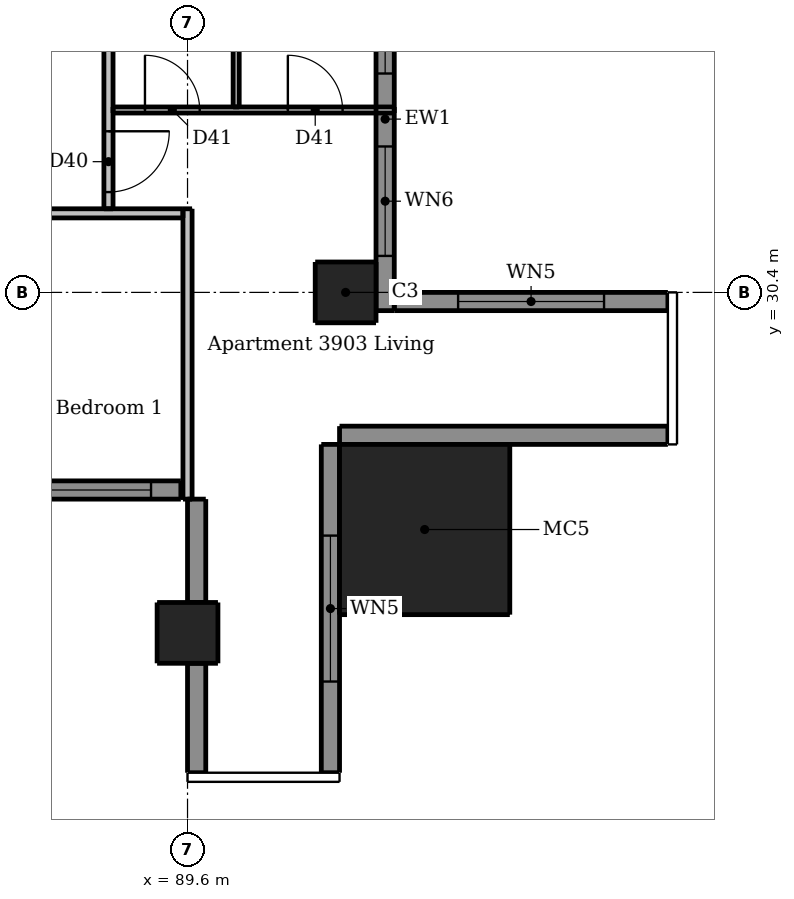
"""IFC4 building model, lengths in metres.
Left out: names, types, materials, properties, quantities, classifications, styles, units other than length and angle.
Written with IfcOpenShell. Run it as: python <this file> out.ifc"""

import sys

from ifc_helpers import new_model, si_unit, direction, frame, frame_2d, origin, origin_2d, place, context, subcontext, project, spatial, rectangle, extrude, element, fill, save


model = new_model("IFC4")
c1 = context("Model", 3, precision=1e-05, world=origin(), true_north=direction((0.0, 1.0)))
c2 = subcontext(c1, "Body", "Model", "MODEL_VIEW")
j1 = project(units=[si_unit("LENGTHUNIT", "METRE"), si_unit("PLANEANGLEUNIT", "RADIAN")], contexts=[c1])
p1 = place(None, origin())
s1 = spatial("IfcSite", under=j1, at=p1, CompositionType="ELEMENT")
p2 = place(p1, origin())
s2 = spatial("IfcBuilding", under=s1, at=p2, CompositionType="ELEMENT")
p3 = place(p2, frame((0.0, 0.0, 147.1)))
s3 = spatial("IfcBuildingStorey", under=s2, at=p3, CompositionType="ELEMENT", Elevation=147.1)
for number, where, z_axis, x_axis in (
    (1, (89.6, 24.8, 0.0), (0.0, 0.0, 1.0), (1.0, 0.0, 0.0)),
    (2, (92.2, 30.4, 0.0), (0.0, 0.0, 1.0), (1.0, 0.0, 0.0)),
):
    element("IfcColumn", number, at=place(p3, frame(where, z_axis=z_axis, x_axis=x_axis)), inside=s3, PredefinedType="COLUMN", context=c2, shape_type="SweptSolid", body=[
        extrude(rectangle(XDim=1.0, YDim=1.0, at=origin_2d()), origin(), (0.0, 0.0, 1.0), 3.0),
    ])
p4 = place(p3, frame((93.5, 26.5, 0.0), z_axis=(0.0, 0.0, 1.0), x_axis=(1.0, 0.0, 0.0)))
e3 = element("IfcColumn", 3, at=p4, inside=s3, PredefinedType="COLUMN", context=c2, shape_type="SweptSolid", body=[
    extrude(rectangle(XDim=2.8, YDim=2.8, at=origin_2d()), origin(), (0.0, 0.0, 1.0), 3.3),
])
p5 = place(p3, frame((89.75, 27.0, 0.0), z_axis=(0.0, 0.0, 1.0), x_axis=(0.0, -1.0, 0.0)))
e4 = element("IfcWall", 4, at=p5, inside=s3, PredefinedType="SOLIDWALL", context=c2, shape_type="SweptSolid", body=[
    extrude(rectangle(XDim=1.7, YDim=0.3, at=frame_2d((0.85, 0.0))), origin(), (0.0, 0.0, 1.0), 3.0),
])
p6 = place(p3, frame((89.75, 24.3, 0.0), z_axis=(0.0, 0.0, 1.0), x_axis=(0.0, -1.0, 0.0)))
e5 = element("IfcWall", 5, at=p6, inside=s3, PredefinedType="SOLIDWALL", context=c2, shape_type="SweptSolid", body=[
    extrude(rectangle(XDim=1.8, YDim=0.3, at=frame_2d((0.9, 0.0))), origin(), (0.0, 0.0, 1.0), 3.0),
])
p7 = place(p3, frame((91.95, 22.5, 0.0), z_axis=(0.0, 0.0, 1.0), x_axis=(0.0, 1.0, 0.0)))
e6 = element("IfcWall", 6, at=p7, inside=s3, PredefinedType="SOLIDWALL", context=c2, shape_type="SweptSolid", body=[
    extrude(rectangle(XDim=5.4, YDim=0.3, at=frame_2d((2.7, 0.0))), origin(), (0.0, 0.0, 1.0), 3.0),
])
p8 = place(p7, frame((1.5, 0.0, 0.15)))
e7 = element("IfcOpeningElement", 7, at=p8, cuts=e6, PredefinedType="OPENING", context=c2, shape_type="SweptSolid", body=[
    extrude(rectangle(XDim=2.4, YDim=2.1, at=frame_2d((1.2, 1.05))), frame((0.0, 0.16, 0.0), z_axis=(0.0, -1.0, 0.0), x_axis=(1.0, 0.0, 0.0)), (0.0, 0.0, 1.0), 0.32),
])
p9 = place(p3, frame((92.1, 28.05, 0.0), z_axis=(0.0, 0.0, 1.0), x_axis=(1.0, 0.0, 0.0)))
e8 = element("IfcWall", 8, at=p9, inside=s3, PredefinedType="SOLIDWALL", context=c2, shape_type="SweptSolid", body=[
    extrude(rectangle(XDim=5.4, YDim=0.3, at=frame_2d((2.7, 0.0))), origin(), (0.0, 0.0, 1.0), 3.0),
])
p10 = place(p3, frame((97.5, 30.25, 0.0), z_axis=(0.0, 0.0, 1.0), x_axis=(-1.0, 0.0, 0.0)))
e9 = element("IfcWall", 9, at=p10, inside=s3, PredefinedType="SOLIDWALL", context=c2, shape_type="SweptSolid", body=[
    extrude(rectangle(XDim=4.5, YDim=0.3, at=frame_2d((2.25, 0.0))), origin(), (0.0, 0.0, 1.0), 3.0),
])
p11 = place(p10, frame((1.05, 0.0, 0.15)))
e10 = element("IfcOpeningElement", 10, at=p11, cuts=e9, PredefinedType="OPENING", context=c2, shape_type="SweptSolid", body=[
    extrude(rectangle(XDim=2.4, YDim=2.1, at=frame_2d((1.2, 1.05))), frame((0.0, 0.16, 0.0), z_axis=(0.0, -1.0, 0.0), x_axis=(1.0, 0.0, 0.0)), (0.0, 0.0, 1.0), 0.32),
])
p12 = place(p3, frame((83.7, 27.15, 0.0), z_axis=(0.0, 0.0, 1.0), x_axis=(1.0, 0.0, 0.0)))
e11 = element("IfcWall", 11, at=p12, inside=s3, PredefinedType="SOLIDWALL", context=c2, shape_type="SweptSolid", body=[
    extrude(rectangle(XDim=5.79, YDim=0.3, at=frame_2d((2.895, 0.0))), origin(), (0.0, 0.0, 1.0), 3.0),
])
p13 = place(p12, frame((0.5, 0.0, 0.15)))
e12 = element("IfcOpeningElement", 12, at=p13, cuts=e11, PredefinedType="OPENING", context=c2, shape_type="SweptSolid", body=[
    extrude(rectangle(XDim=1.8, YDim=2.1, at=frame_2d((0.9, 1.05))), frame((0.0, 0.16, 0.0), z_axis=(0.0, -1.0, 0.0), x_axis=(1.0, 0.0, 0.0)), (0.0, 0.0, 1.0), 0.32),
])
p14 = place(p12, frame((3.5, 0.0, 0.15)))
e13 = element("IfcOpeningElement", 13, at=p14, cuts=e11, PredefinedType="OPENING", context=c2, shape_type="SweptSolid", body=[
    extrude(rectangle(XDim=1.8, YDim=2.1, at=frame_2d((0.9, 1.05))), frame((0.0, 0.16, 0.0), z_axis=(0.0, -1.0, 0.0), x_axis=(1.0, 0.0, 0.0)), (0.0, 0.0, 1.0), 0.32),
])
p15 = place(p3, frame((92.85, 30.1, 0.0), z_axis=(0.0, 0.0, 1.0), x_axis=(0.0, 1.0, 0.0)))
e14 = element("IfcWall", 14, at=p15, inside=s3, PredefinedType="SOLIDWALL", context=c2, shape_type="SweptSolid", body=[
    extrude(rectangle(XDim=6.3, YDim=0.3, at=frame_2d((3.15, 0.0))), origin(), (0.0, 0.0, 1.0), 3.0),
])
p16 = place(p15, frame((0.9, 0.0, 0.15)))
e15 = element("IfcOpeningElement", 15, at=p16, cuts=e14, PredefinedType="OPENING", context=c2, shape_type="SweptSolid", body=[
    extrude(rectangle(XDim=1.8, YDim=2.1, at=frame_2d((0.9, 1.05))), frame((0.0, 0.16, 0.0), z_axis=(0.0, -1.0, 0.0), x_axis=(1.0, 0.0, 0.0)), (0.0, 0.0, 1.0), 0.32),
])
p17 = place(p15, frame((3.9, 0.0, 0.15)))
e16 = element("IfcOpeningElement", 16, at=p17, cuts=e14, PredefinedType="OPENING", context=c2, shape_type="SweptSolid", body=[
    extrude(rectangle(XDim=1.8, YDim=2.1, at=frame_2d((0.9, 1.05))), frame((0.0, 0.16, 0.0), z_axis=(0.0, -1.0, 0.0), x_axis=(1.0, 0.0, 0.0)), (0.0, 0.0, 1.0), 0.32),
])
p18 = place(p3, frame((90.4, 33.45, 0.0), z_axis=(0.0, 0.0, 1.0), x_axis=(0.0, 1.0, 0.0)))
e17 = element("IfcWall", 17, at=p18, inside=s3, PredefinedType="PARTITIONING", context=c2, shape_type="SweptSolid", body=[
    extrude(rectangle(XDim=5.875, YDim=0.1, at=frame_2d((2.938, 0.0))), origin(), (0.0, 0.0, 1.0), 3.0),
])
p19 = place(p18, frame((3.75, 0.0, 0.0)))
e18 = element("IfcOpeningElement", 18, at=p19, cuts=e17, PredefinedType="OPENING", context=c2, shape_type="SweptSolid", body=[
    extrude(rectangle(XDim=0.8, YDim=2.1, at=frame_2d((0.4, 1.05))), frame((0.0, 0.06, 0.0), z_axis=(0.0, -1.0, 0.0), x_axis=(1.0, 0.0, 0.0)), (0.0, 0.0, 1.0), 0.12),
])
p20 = place(p3, frame((88.375, 33.4, 0.0), z_axis=(0.0, 0.0, 1.0), x_axis=(1.0, 0.0, 0.0)))
e19 = element("IfcWall", 19, at=p20, inside=s3, PredefinedType="PARTITIONING", context=c2, shape_type="SweptSolid", body=[
    extrude(rectangle(XDim=4.625, YDim=0.1, at=frame_2d((2.312, 0.0))), origin(), (0.0, 0.0, 1.0), 3.0),
])
p21 = place(p20, frame((0.525, 0.0, 0.0)))
e20 = element("IfcOpeningElement", 20, at=p21, cuts=e19, PredefinedType="OPENING", context=c2, shape_type="SweptSolid", body=[
    extrude(rectangle(XDim=0.9, YDim=2.1, at=frame_2d((0.45, 1.05))), frame((0.0, 0.06, 0.0), z_axis=(0.0, -1.0, 0.0), x_axis=(1.0, 0.0, 0.0)), (0.0, 0.0, 1.0), 0.12),
])
p22 = place(p20, frame((2.875, 0.0, 0.0)))
e21 = element("IfcOpeningElement", 21, at=p22, cuts=e19, PredefinedType="OPENING", context=c2, shape_type="SweptSolid", body=[
    extrude(rectangle(XDim=0.9, YDim=2.1, at=frame_2d((0.45, 1.05))), frame((0.0, 0.06, 0.0), z_axis=(0.0, -1.0, 0.0), x_axis=(1.0, 0.0, 0.0)), (0.0, 0.0, 1.0), 0.12),
])
p23 = place(p3, frame((88.3, 60.475, 0.0), z_axis=(0.0, 0.0, 1.0), x_axis=(0.0, -1.0, 0.0)))
e22 = element("IfcWall", 22, at=p23, inside=s3, PredefinedType="PARTITIONING", context=c2, shape_type="SweptSolid", body=[
    extrude(rectangle(XDim=28.7, YDim=0.15, at=frame_2d((14.35, 0.0))), origin(), (0.0, 0.0, 1.0), 3.0),
])
p24 = place(p23, frame((27.425, 0.0, 0.0)))
e23 = element("IfcOpeningElement", 23, at=p24, cuts=e22, PredefinedType="OPENING", context=c2, shape_type="SweptSolid", body=[
    extrude(rectangle(XDim=1.0, YDim=2.1, at=frame_2d((0.5, 1.05))), frame((0.0, 0.085, 0.0), z_axis=(0.0, -1.0, 0.0), x_axis=(1.0, 0.0, 0.0)), (0.0, 0.0, 1.0), 0.17),
])
p25 = place(p23, frame((13.075, 0.0, 0.0)))
e24 = element("IfcOpeningElement", 24, at=p25, cuts=e22, PredefinedType="OPENING", context=c2, shape_type="SweptSolid", body=[
    extrude(rectangle(XDim=1.0, YDim=2.1, at=frame_2d((0.5, 1.05))), frame((0.0, 0.085, 0.0), z_axis=(0.0, -1.0, 0.0), x_axis=(1.0, 0.0, 0.0)), (0.0, 0.0, 1.0), 0.17),
])
p26 = place(p23, frame((2.575, 0.0, 0.0)))
e25 = element("IfcOpeningElement", 25, at=p26, cuts=e22, PredefinedType="OPENING", context=c2, shape_type="SweptSolid", body=[
    extrude(rectangle(XDim=1.0, YDim=2.1, at=frame_2d((0.5, 1.05))), frame((0.0, 0.085, 0.0), z_axis=(0.0, -1.0, 0.0), x_axis=(1.0, 0.0, 0.0)), (0.0, 0.0, 1.0), 0.17),
])
p27 = place(p3, frame((89.6, 27.0, 0.0), z_axis=(0.0, 0.0, 1.0), x_axis=(0.0, 1.0, 0.0)))
e26 = element("IfcWall", 26, at=p27, inside=s3, PredefinedType="PARTITIONING", context=c2, shape_type="SweptSolid", body=[
    extrude(rectangle(XDim=4.775, YDim=0.15, at=frame_2d((2.387, 0.0))), origin(), (0.0, 0.0, 1.0), 2.46),
])
p28 = place(p3, frame((89.525, 31.7, 0.0), z_axis=(0.0, 0.0, 1.0), x_axis=(-1.0, 0.0, 0.0)))
e27 = element("IfcWall", 27, at=p28, inside=s3, PredefinedType="PARTITIONING", context=c2, shape_type="SweptSolid", body=[
    extrude(rectangle(XDim=28.75, YDim=0.15, at=frame_2d((14.375, 0.0))), origin(), (0.0, 0.0, 1.0), 3.0),
])
p29 = place(p28, frame((25.875, 0.0, 0.0)))
e28 = element("IfcOpeningElement", 28, at=p29, cuts=e27, PredefinedType="OPENING", context=c2, shape_type="SweptSolid", body=[
    extrude(rectangle(XDim=1.0, YDim=2.1, at=frame_2d((0.5, 1.05))), frame((0.0, 0.085, 0.0), z_axis=(0.0, -1.0, 0.0), x_axis=(1.0, 0.0, 0.0)), (0.0, 0.0, 1.0), 0.17),
])
p30 = place(p28, frame((9.925, 0.0, 0.0)))
e29 = element("IfcOpeningElement", 29, at=p30, cuts=e27, PredefinedType="OPENING", context=c2, shape_type="SweptSolid", body=[
    extrude(rectangle(XDim=1.0, YDim=2.1, at=frame_2d((0.5, 1.05))), frame((0.0, 0.085, 0.0), z_axis=(0.0, -1.0, 0.0), x_axis=(1.0, 0.0, 0.0)), (0.0, 0.0, 1.0), 0.17),
])
p31 = place(p8, origin())
e30 = element("IfcWindow", 30, at=p31, inside=s3, PartitioningType="DOUBLE_PANEL_VERTICAL", PredefinedType="WINDOW", context=c2, shape_type="SweptSolid", body=[
    extrude(rectangle(XDim=2.4, YDim=2.1, at=frame_2d((1.2, 1.05))), frame((0.0, 0.03, 0.0), z_axis=(0.0, -1.0, 0.0), x_axis=(1.0, 0.0, 0.0)), (0.0, 0.0, 1.0), 0.06),
])
fill(e7, e30)
p32 = place(p11, origin())
e31 = element("IfcWindow", 31, at=p32, inside=s3, PartitioningType="DOUBLE_PANEL_VERTICAL", PredefinedType="WINDOW", context=c2, shape_type="SweptSolid", body=[
    extrude(rectangle(XDim=2.4, YDim=2.1, at=frame_2d((1.2, 1.05))), frame((0.0, 0.03, 0.0), z_axis=(0.0, -1.0, 0.0), x_axis=(1.0, 0.0, 0.0)), (0.0, 0.0, 1.0), 0.06),
])
fill(e10, e31)
p33 = place(p14, origin())
e32 = element("IfcWindow", 32, at=p33, inside=s3, PartitioningType="DOUBLE_PANEL_VERTICAL", PredefinedType="WINDOW", context=c2, shape_type="SweptSolid", body=[
    extrude(rectangle(XDim=1.8, YDim=2.1, at=frame_2d((0.9, 1.05))), frame((0.0, 0.03, 0.0), z_axis=(0.0, -1.0, 0.0), x_axis=(1.0, 0.0, 0.0)), (0.0, 0.0, 1.0), 0.06),
])
fill(e13, e32)
p34 = place(p16, origin())
e33 = element("IfcWindow", 33, at=p34, inside=s3, PartitioningType="DOUBLE_PANEL_VERTICAL", PredefinedType="WINDOW", context=c2, shape_type="SweptSolid", body=[
    extrude(rectangle(XDim=1.8, YDim=2.1, at=frame_2d((0.9, 1.05))), frame((0.0, 0.03, 0.0), z_axis=(0.0, -1.0, 0.0), x_axis=(1.0, 0.0, 0.0)), (0.0, 0.0, 1.0), 0.06),
])
fill(e15, e33)
p35 = place(p17, origin())
e34 = element("IfcWindow", 34, at=p35, inside=s3, PartitioningType="DOUBLE_PANEL_VERTICAL", PredefinedType="WINDOW", context=c2, shape_type="SweptSolid", body=[
    extrude(rectangle(XDim=1.8, YDim=2.1, at=frame_2d((0.9, 1.05))), frame((0.0, 0.03, 0.0), z_axis=(0.0, -1.0, 0.0), x_axis=(1.0, 0.0, 0.0)), (0.0, 0.0, 1.0), 0.06),
])
fill(e16, e34)
p36 = place(p24, origin())
e35 = element("IfcDoor", 35, at=p36, inside=s3, OperationType="SINGLE_SWING_LEFT", PredefinedType="DOOR", context=c2, shape_type="SweptSolid", body=[
    extrude(rectangle(XDim=1.0, YDim=2.1, at=frame_2d((0.5, 1.05))), frame((0.0, 0.025, 0.0), z_axis=(0.0, -1.0, 0.0), x_axis=(1.0, 0.0, 0.0)), (0.0, 0.0, 1.0), 0.05),
])
fill(e23, e35)
p37 = place(p21, origin())
e36 = element("IfcDoor", 36, at=p37, inside=s3, OperationType="SINGLE_SWING_LEFT", PredefinedType="DOOR", context=c2, shape_type="SweptSolid", body=[
    extrude(rectangle(XDim=0.9, YDim=2.1, at=frame_2d((0.45, 1.05))), frame((0.0, 0.025, 0.0), z_axis=(0.0, -1.0, 0.0), x_axis=(1.0, 0.0, 0.0)), (0.0, 0.0, 1.0), 0.05),
])
fill(e20, e36)
p38 = place(p22, origin())
e37 = element("IfcDoor", 37, at=p38, inside=s3, OperationType="SINGLE_SWING_LEFT", PredefinedType="DOOR", context=c2, shape_type="SweptSolid", body=[
    extrude(rectangle(XDim=0.9, YDim=2.1, at=frame_2d((0.45, 1.05))), frame((0.0, 0.025, 0.0), z_axis=(0.0, -1.0, 0.0), x_axis=(1.0, 0.0, 0.0)), (0.0, 0.0, 1.0), 0.05),
])
fill(e21, e37)
save(model, sys.argv[1])
